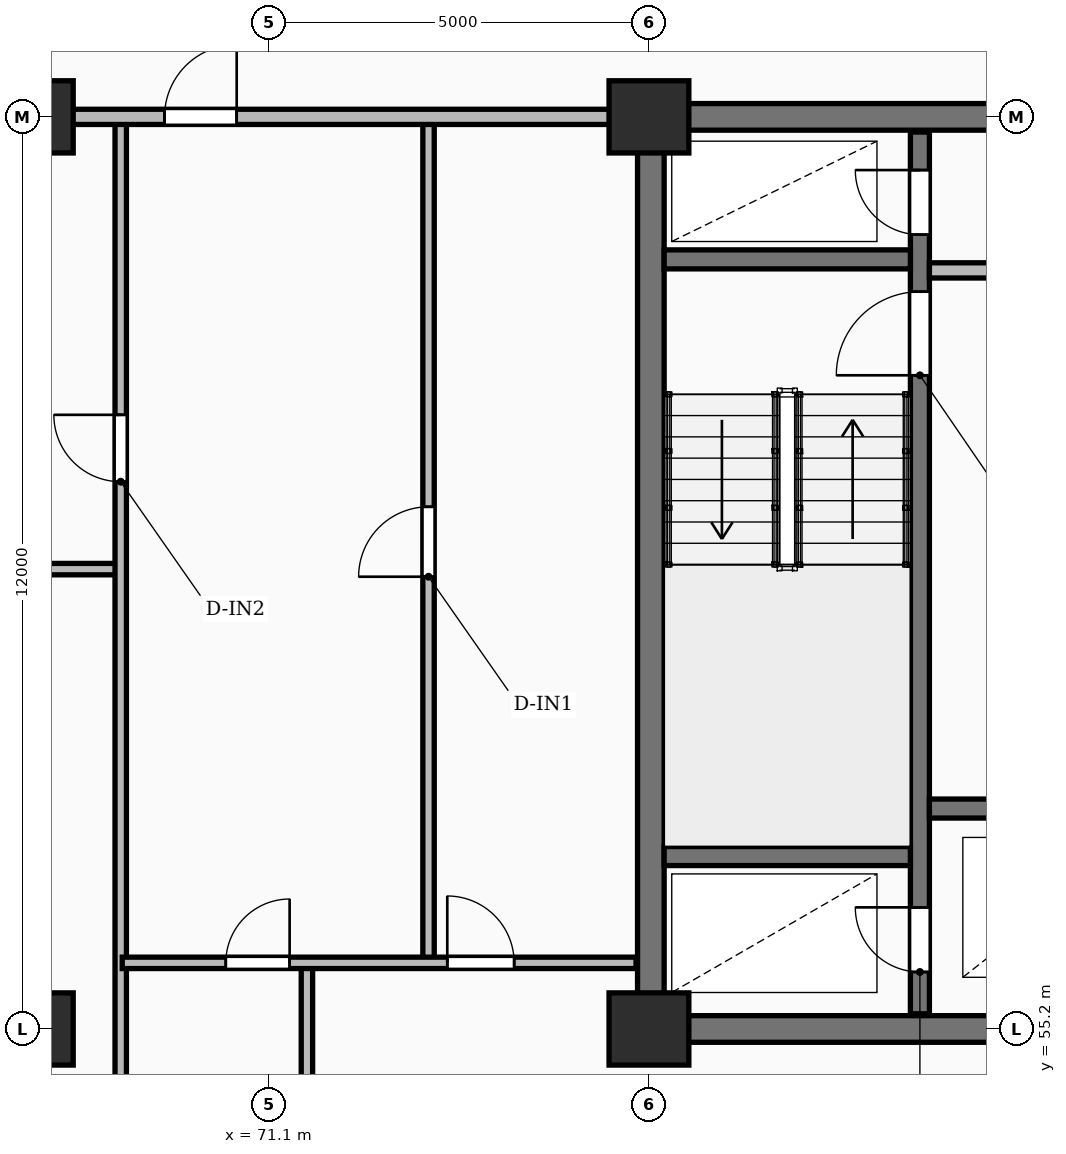
"""IFC4 building model, lengths in metres.
Left out: names, types, materials, properties, quantities, classifications, styles, units other than length and angle.
Written with IfcOpenShell. Run it as: python <this file> out.ifc"""

import sys

from ifc_helpers import new_model, si_unit, direction, frame, frame_2d, origin, origin_2d, place, context, subcontext, project, spatial, rectangle, extrude, element, fill, save


model = new_model("IFC4")
c1 = context("Model", 3, precision=1e-05, world=origin(), true_north=direction((0.0, 1.0)))
c2 = subcontext(c1, "Body", "Model", "MODEL_VIEW")
j1 = project(units=[si_unit("LENGTHUNIT", "METRE"), si_unit("PLANEANGLEUNIT", "RADIAN")], contexts=[c1])
p1 = place(None, origin())
s1 = spatial("IfcSite", under=j1, at=p1, CompositionType="ELEMENT")
p2 = place(p1, origin())
s2 = spatial("IfcBuilding", under=s1, at=p2, CompositionType="ELEMENT")
p3 = place(p2, frame((0.0, 0.0, 24.0)))
s3 = spatial("IfcBuildingStorey", under=s2, at=p3, CompositionType="ELEMENT", Elevation=24.0)
for number, where, z_axis, x_axis in (
    (1, (68.0, 55.2, 0.0), (0.0, 0.0, 1.0), (1.0, 0.0, 0.0)),
    (2, (68.0, 67.2, 0.0), (0.0, 0.0, 1.0), (1.0, 0.0, 0.0)),
    (3, (76.1, 55.2, 0.0), (0.0, 0.0, 1.0), (1.0, 0.0, 0.0)),
    (4, (76.1, 67.2, 0.0), (0.0, 0.0, 1.0), (1.0, 0.0, 0.0)),
):
    element("IfcColumn", number, at=place(p3, frame(where, z_axis=z_axis, x_axis=x_axis)), inside=s3, PredefinedType="COLUMN", context=c2, shape_type="SweptSolid", body=[
        extrude(rectangle(XDim=1.05, YDim=0.95, at=origin_2d()), origin(), (0.0, 0.0, 1.0), 3.25),
    ])
p4 = place(p3, frame((75.95, 55.2, 0.0), z_axis=(0.0, 0.0, 1.0), x_axis=(1.0, 0.0, 0.0)))
e5 = element("IfcWall", 5, at=p4, inside=s3, PredefinedType="SHEAR", context=c2, shape_type="SweptSolid", body=[
    extrude(rectangle(XDim=36.3, YDim=0.35, at=frame_2d((18.15, 0.0))), origin(), (0.0, 0.0, 1.0), 3.25),
])
p5 = place(p3, frame((76.125, 55.375, 0.0), z_axis=(0.0, 0.0, 1.0), x_axis=(0.0, 1.0, 0.0)))
e6 = element("IfcWall", 6, at=p5, inside=s3, PredefinedType="SHEAR", context=c2, shape_type="SweptSolid", body=[
    extrude(rectangle(XDim=11.65, YDim=0.35, at=frame_2d((5.825, 0.0))), origin(), (0.0, 0.0, 1.0), 3.25),
])
p6 = place(p3, frame((75.95, 67.2, 0.0), z_axis=(0.0, 0.0, 1.0), x_axis=(1.0, 0.0, 0.0)))
e7 = element("IfcWall", 7, at=p6, inside=s3, PredefinedType="SHEAR", context=c2, shape_type="SweptSolid", body=[
    extrude(rectangle(XDim=36.3, YDim=0.35, at=frame_2d((18.15, 0.0))), origin(), (0.0, 0.0, 1.0), 3.25),
])
p7 = place(p6, frame((5.25, 0.0, 0.0)))
e8 = element("IfcOpeningElement", 8, at=p7, cuts=e7, PredefinedType="OPENING", context=c2, shape_type="SweptSolid", body=[
    extrude(rectangle(XDim=1.0, YDim=2.15, at=frame_2d((0.5, 1.075))), frame((0.0, 0.185, 0.0), z_axis=(0.0, -1.0, 0.0), x_axis=(1.0, 0.0, 0.0)), (0.0, 0.0, 1.0), 0.37),
])
p8 = place(p6, frame((21.6, 0.0, 0.0)))
e9 = element("IfcOpeningElement", 9, at=p8, cuts=e7, PredefinedType="OPENING", context=c2, shape_type="SweptSolid", body=[
    extrude(rectangle(XDim=1.5, YDim=2.2, at=frame_2d((0.75, 1.1))), frame((0.0, 0.185, 0.0), z_axis=(0.0, -1.0, 0.0), x_axis=(1.0, 0.0, 0.0)), (0.0, 0.0, 1.0), 0.37),
])
p9 = place(p6, frame((30.45, 0.0, 0.0)))
e10 = element("IfcOpeningElement", 10, at=p9, cuts=e7, PredefinedType="OPENING", context=c2, shape_type="SweptSolid", body=[
    extrude(rectangle(XDim=1.0, YDim=2.15, at=frame_2d((0.5, 1.075))), frame((0.0, 0.185, 0.0), z_axis=(0.0, -1.0, 0.0), x_axis=(1.0, 0.0, 0.0)), (0.0, 0.0, 1.0), 0.37),
])
p10 = place(p3, frame((79.665, 55.4, 0.0), z_axis=(0.0, 0.0, 1.0), x_axis=(0.0, 1.0, 0.0)))
e11 = element("IfcWall", 11, at=p10, inside=s3, PredefinedType="SHEAR", context=c2, shape_type="SweptSolid", body=[
    extrude(rectangle(XDim=11.6, YDim=0.25, at=frame_2d((5.8, 0.0))), origin(), (0.0, 0.0, 1.0), 3.25),
])
p11 = place(p10, frame((0.55, 0.0, 0.0)))
e12 = element("IfcOpeningElement", 12, at=p11, cuts=e11, PredefinedType="OPENING", context=c2, shape_type="SweptSolid", body=[
    extrude(rectangle(XDim=0.85, YDim=2.05, at=frame_2d((0.425, 1.025))), frame((0.0, 0.135, 0.0), z_axis=(0.0, -1.0, 0.0), x_axis=(1.0, 0.0, 0.0)), (0.0, 0.0, 1.0), 0.27),
])
p12 = place(p10, frame((8.4, 0.0, 0.0)))
e13 = element("IfcOpeningElement", 13, at=p12, cuts=e11, PredefinedType="OPENING", context=c2, shape_type="SweptSolid", body=[
    extrude(rectangle(XDim=1.1, YDim=2.1, at=frame_2d((0.55, 1.05))), frame((0.0, 0.135, 0.0), z_axis=(0.0, -1.0, 0.0), x_axis=(1.0, 0.0, 0.0)), (0.0, 0.0, 1.0), 0.27),
])
p13 = place(p10, frame((10.25, 0.0, 0.0)))
e14 = element("IfcOpeningElement", 14, at=p13, cuts=e11, PredefinedType="OPENING", context=c2, shape_type="SweptSolid", body=[
    extrude(rectangle(XDim=0.85, YDim=2.05, at=frame_2d((0.425, 1.025))), frame((0.0, 0.135, 0.0), z_axis=(0.0, -1.0, 0.0), x_axis=(1.0, 0.0, 0.0)), (0.0, 0.0, 1.0), 0.27),
])
for number, where, z_axis, x_axis in (
    (15, (76.3, 57.475, 0.0), (0.0, 0.0, 1.0), (1.0, 0.0, 0.0)),
    (16, (76.3, 65.325, 0.0), (0.0, 0.0, 1.0), (1.0, 0.0, 0.0)),
):
    element("IfcWall", number, at=place(p3, frame(where, z_axis=z_axis, x_axis=x_axis)), inside=s3, PredefinedType="SHEAR", context=c2, shape_type="SweptSolid", body=[
        extrude(rectangle(XDim=3.24, YDim=0.25, at=frame_2d((1.62, 0.0))), origin(), (0.0, 0.0, 1.0), 3.25),
    ])
p14 = place(p3, frame((79.79, 58.1, 0.0), z_axis=(0.0, 0.0, 1.0), x_axis=(1.0, 0.0, 0.0)))
e17 = element("IfcWall", 17, at=p14, inside=s3, PredefinedType="SHEAR", context=c2, shape_type="SweptSolid", body=[
    extrude(rectangle(XDim=4.39, YDim=0.25, at=frame_2d((2.195, 0.0))), origin(), (0.0, 0.0, 1.0), 3.25),
])
p15 = place(p14, frame((1.05, 0.0, 0.0)))
e18 = element("IfcOpeningElement", 18, at=p15, cuts=e17, PredefinedType="OPENING", context=c2, shape_type="SweptSolid", body=[
    extrude(rectangle(XDim=1.12, YDim=2.12, at=frame_2d((0.56, 1.06))), frame((0.0, 0.135, 0.0), z_axis=(0.0, -1.0, 0.0), x_axis=(1.0, 0.0, 0.0)), (0.0, 0.0, 1.0), 0.27),
])
p16 = place(p14, frame((3.26, 0.0, 0.0)))
e19 = element("IfcOpeningElement", 19, at=p16, cuts=e17, PredefinedType="OPENING", context=c2, shape_type="SweptSolid", body=[
    extrude(rectangle(XDim=0.85, YDim=2.05, at=frame_2d((0.425, 1.025))), frame((0.0, 0.135, 0.0), z_axis=(0.0, -1.0, 0.0), x_axis=(1.0, 0.0, 0.0)), (0.0, 0.0, 1.0), 0.27),
])
p17 = place(p3, frame((79.79, 65.18, 0.0), z_axis=(0.0, 0.0, 1.0), x_axis=(1.0, 0.0, 0.0)))
e20 = element("IfcWall", 20, at=p17, inside=s3, PredefinedType="PARTITIONING", context=c2, shape_type="SweptSolid", body=[
    extrude(rectangle(XDim=4.39, YDim=0.2, at=frame_2d((2.195, 0.0))), origin(), (0.0, 0.0, 1.0), 2.97),
])
p18 = place(p17, frame((1.5, 0.0, 0.0)))
e21 = element("IfcOpeningElement", 21, at=p18, cuts=e20, PredefinedType="OPENING", context=c2, shape_type="SweptSolid", body=[
    extrude(rectangle(XDim=1.1, YDim=2.1, at=frame_2d((0.55, 1.05))), frame((0.0, 0.11, 0.0), z_axis=(0.0, -1.0, 0.0), x_axis=(1.0, 0.0, 0.0)), (0.0, 0.0, 1.0), 0.22),
])
p19 = place(p3, frame((55.3, 61.25, 0.0), z_axis=(0.0, 0.0, 1.0), x_axis=(1.0, 0.0, 0.0)))
e22 = element("IfcWall", 22, at=p19, inside=s3, PredefinedType="PARTITIONING", context=c2, shape_type="SweptSolid", body=[
    extrude(rectangle(XDim=13.85, YDim=0.15, at=frame_2d((6.925, 0.0))), origin(), (0.0, 0.0, 1.0), 2.97),
])
p20 = place(p19, frame((6.505, 0.0, 0.0)))
e23 = element("IfcOpeningElement", 23, at=p20, cuts=e22, PredefinedType="OPENING", context=c2, shape_type="SweptSolid", body=[
    extrude(rectangle(XDim=0.84, YDim=2.04, at=frame_2d((0.42, 1.02))), frame((0.0, 0.085, 0.0), z_axis=(0.0, -1.0, 0.0), x_axis=(1.0, 0.0, 0.0)), (0.0, 0.0, 1.0), 0.17),
])
p21 = place(p3, frame((69.15, 51.1, 0.0), z_axis=(0.0, 0.0, 1.0), x_axis=(0.0, 1.0, 0.0)))
e24 = element("IfcWall", 24, at=p21, inside=s3, PredefinedType="PARTITIONING", context=c2, shape_type="SweptSolid", body=[
    extrude(rectangle(XDim=16.05, YDim=0.15, at=frame_2d((8.025, 0.0))), origin(), (0.0, 0.0, 1.0), 2.97),
])
p22 = place(p21, frame((11.3, 0.0, 0.0)))
e25 = element("IfcOpeningElement", 25, at=p22, cuts=e24, PredefinedType="OPENING", context=c2, shape_type="SweptSolid", body=[
    extrude(rectangle(XDim=0.88, YDim=2.06, at=frame_2d((0.44, 1.03))), frame((0.0, 0.085, 0.0), z_axis=(0.0, -1.0, 0.0), x_axis=(1.0, 0.0, 0.0)), (0.0, 0.0, 1.0), 0.17),
])
p23 = place(p3, frame((73.2, 56.07, 0.0), z_axis=(0.0, 0.0, 1.0), x_axis=(0.0, 1.0, 0.0)))
e26 = element("IfcWall", 26, at=p23, inside=s3, PredefinedType="PARTITIONING", context=c2, shape_type="SweptSolid", body=[
    extrude(rectangle(XDim=11.08, YDim=0.15, at=frame_2d((5.54, 0.0))), origin(), (0.0, 0.0, 1.0), 2.97),
])
p24 = place(p23, frame((5.08, 0.0, 0.0)))
e27 = element("IfcOpeningElement", 27, at=p24, cuts=e26, PredefinedType="OPENING", context=c2, shape_type="SweptSolid", body=[
    extrude(rectangle(XDim=0.92, YDim=2.08, at=frame_2d((0.46, 1.04))), frame((0.0, 0.085, 0.0), z_axis=(0.0, -1.0, 0.0), x_axis=(1.0, 0.0, 0.0)), (0.0, 0.0, 1.0), 0.17),
])
p25 = place(p3, frame((71.6, 51.1, 0.0), z_axis=(0.0, 0.0, 1.0), x_axis=(0.0, 1.0, 0.0)))
e28 = element("IfcWall", 28, at=p25, inside=s3, PredefinedType="PARTITIONING", context=c2, shape_type="SweptSolid", body=[
    extrude(rectangle(XDim=4.97, YDim=0.15, at=frame_2d((2.485, 0.0))), origin(), (0.0, 0.0, 1.0), 2.97),
])
p26 = place(p3, frame((69.17, 56.07, 0.0), z_axis=(0.0, 0.0, 1.0), x_axis=(1.0, 0.0, 0.0)))
e29 = element("IfcWall", 29, at=p26, inside=s3, PredefinedType="PARTITIONING", context=c2, shape_type="SweptSolid", body=[
    extrude(rectangle(XDim=6.76, YDim=0.15, at=frame_2d((3.38, 0.0))), origin(), (0.0, 0.0, 1.0), 2.97),
])
p27 = place(p26, frame((1.362, 0.0, 0.0)))
e30 = element("IfcOpeningElement", 30, at=p27, cuts=e29, PredefinedType="OPENING", context=c2, shape_type="SweptSolid", body=[
    extrude(rectangle(XDim=0.84, YDim=2.04, at=frame_2d((0.42, 1.02))), frame((0.0, 0.085, 0.0), z_axis=(0.0, -1.0, 0.0), x_axis=(1.0, 0.0, 0.0)), (0.0, 0.0, 1.0), 0.17),
])
p28 = place(p26, frame((4.277, 0.0, 0.0)))
e31 = element("IfcOpeningElement", 31, at=p28, cuts=e29, PredefinedType="OPENING", context=c2, shape_type="SweptSolid", body=[
    extrude(rectangle(XDim=0.88, YDim=2.06, at=frame_2d((0.44, 1.03))), frame((0.0, 0.085, 0.0), z_axis=(0.0, -1.0, 0.0), x_axis=(1.0, 0.0, 0.0)), (0.0, 0.0, 1.0), 0.17),
])
p29 = place(p3, frame((55.3, 67.2, 0.0), z_axis=(0.0, 0.0, 1.0), x_axis=(1.0, 0.0, 0.0)))
e32 = element("IfcWall", 32, at=p29, inside=s3, PredefinedType="PARTITIONING", context=c2, shape_type="SweptSolid", body=[
    extrude(rectangle(XDim=20.65, YDim=0.2, at=frame_2d((10.325, 0.0))), origin(), (0.0, 0.0, 1.0), 2.37),
])
p30 = place(p29, frame((14.426, 0.0, 0.0)))
e33 = element("IfcOpeningElement", 33, at=p30, cuts=e32, PredefinedType="OPENING", context=c2, shape_type="SweptSolid", body=[
    extrude(rectangle(XDim=0.95, YDim=2.15, at=frame_2d((0.475, 1.075))), frame((0.0, 0.11, 0.0), z_axis=(0.0, -1.0, 0.0), x_axis=(1.0, 0.0, 0.0)), (0.0, 0.0, 1.0), 0.22),
])
p31 = place(p11, origin())
e34 = element("IfcDoor", 34, at=p31, inside=s3, OperationType="SINGLE_SWING_RIGHT", PredefinedType="DOOR", context=c2, shape_type="SweptSolid", body=[
    extrude(rectangle(XDim=0.85, YDim=2.05, at=frame_2d((0.425, 1.025))), frame((0.0, 0.025, 0.0), z_axis=(0.0, -1.0, 0.0), x_axis=(1.0, 0.0, 0.0)), (0.0, 0.0, 1.0), 0.05),
])
fill(e12, e34)
p32 = place(p12, origin())
e35 = element("IfcDoor", 35, at=p32, inside=s3, OperationType="SINGLE_SWING_LEFT", PredefinedType="DOOR", context=c2, shape_type="SweptSolid", body=[
    extrude(rectangle(XDim=1.1, YDim=2.1, at=frame_2d((0.55, 1.05))), frame((0.0, 0.025, 0.0), z_axis=(0.0, -1.0, 0.0), x_axis=(1.0, 0.0, 0.0)), (0.0, 0.0, 1.0), 0.05),
])
fill(e13, e35)
p33 = place(p13, origin())
e36 = element("IfcDoor", 36, at=p33, inside=s3, OperationType="SINGLE_SWING_RIGHT", PredefinedType="DOOR", context=c2, shape_type="SweptSolid", body=[
    extrude(rectangle(XDim=0.85, YDim=2.05, at=frame_2d((0.425, 1.025))), frame((0.0, 0.025, 0.0), z_axis=(0.0, -1.0, 0.0), x_axis=(1.0, 0.0, 0.0)), (0.0, 0.0, 1.0), 0.05),
])
fill(e14, e36)
p34 = place(p22, origin())
e37 = element("IfcDoor", 37, at=p34, inside=s3, OperationType="SINGLE_SWING_RIGHT", PredefinedType="DOOR", context=c2, shape_type="SweptSolid", body=[
    extrude(rectangle(XDim=0.88, YDim=2.06, at=frame_2d((0.44, 1.03))), frame((0.0, 0.025, 0.0), z_axis=(0.0, -1.0, 0.0), x_axis=(1.0, 0.0, 0.0)), (0.0, 0.0, 1.0), 0.05),
])
fill(e25, e37)
p35 = place(p24, origin())
e38 = element("IfcDoor", 38, at=p35, inside=s3, OperationType="SINGLE_SWING_LEFT", PredefinedType="DOOR", context=c2, shape_type="SweptSolid", body=[
    extrude(rectangle(XDim=0.92, YDim=2.08, at=frame_2d((0.46, 1.04))), frame((0.0, 0.025, 0.0), z_axis=(0.0, -1.0, 0.0), x_axis=(1.0, 0.0, 0.0)), (0.0, 0.0, 1.0), 0.05),
])
fill(e27, e38)
p36 = place(p27, origin())
e39 = element("IfcDoor", 39, at=p36, inside=s3, OperationType="SINGLE_SWING_RIGHT", PredefinedType="DOOR", context=c2, shape_type="SweptSolid", body=[
    extrude(rectangle(XDim=0.84, YDim=2.04, at=frame_2d((0.42, 1.02))), frame((0.0, 0.025, 0.0), z_axis=(0.0, -1.0, 0.0), x_axis=(1.0, 0.0, 0.0)), (0.0, 0.0, 1.0), 0.05),
])
fill(e30, e39)
p37 = place(p28, origin())
e40 = element("IfcDoor", 40, at=p37, inside=s3, OperationType="SINGLE_SWING_LEFT", PredefinedType="DOOR", context=c2, shape_type="SweptSolid", body=[
    extrude(rectangle(XDim=0.88, YDim=2.06, at=frame_2d((0.44, 1.03))), frame((0.0, 0.025, 0.0), z_axis=(0.0, -1.0, 0.0), x_axis=(1.0, 0.0, 0.0)), (0.0, 0.0, 1.0), 0.05),
])
fill(e31, e40)
p38 = place(p30, origin())
e41 = element("IfcDoor", 41, at=p38, inside=s3, OperationType="SINGLE_SWING_RIGHT", PredefinedType="DOOR", context=c2, shape_type="SweptSolid", body=[
    extrude(rectangle(XDim=0.95, YDim=2.15, at=frame_2d((0.475, 1.075))), frame((0.0, 0.025, 0.0), z_axis=(0.0, -1.0, 0.0), x_axis=(1.0, 0.0, 0.0)), (0.0, 0.0, 1.0), 0.05),
])
fill(e33, e41)
save(model, sys.argv[1])
